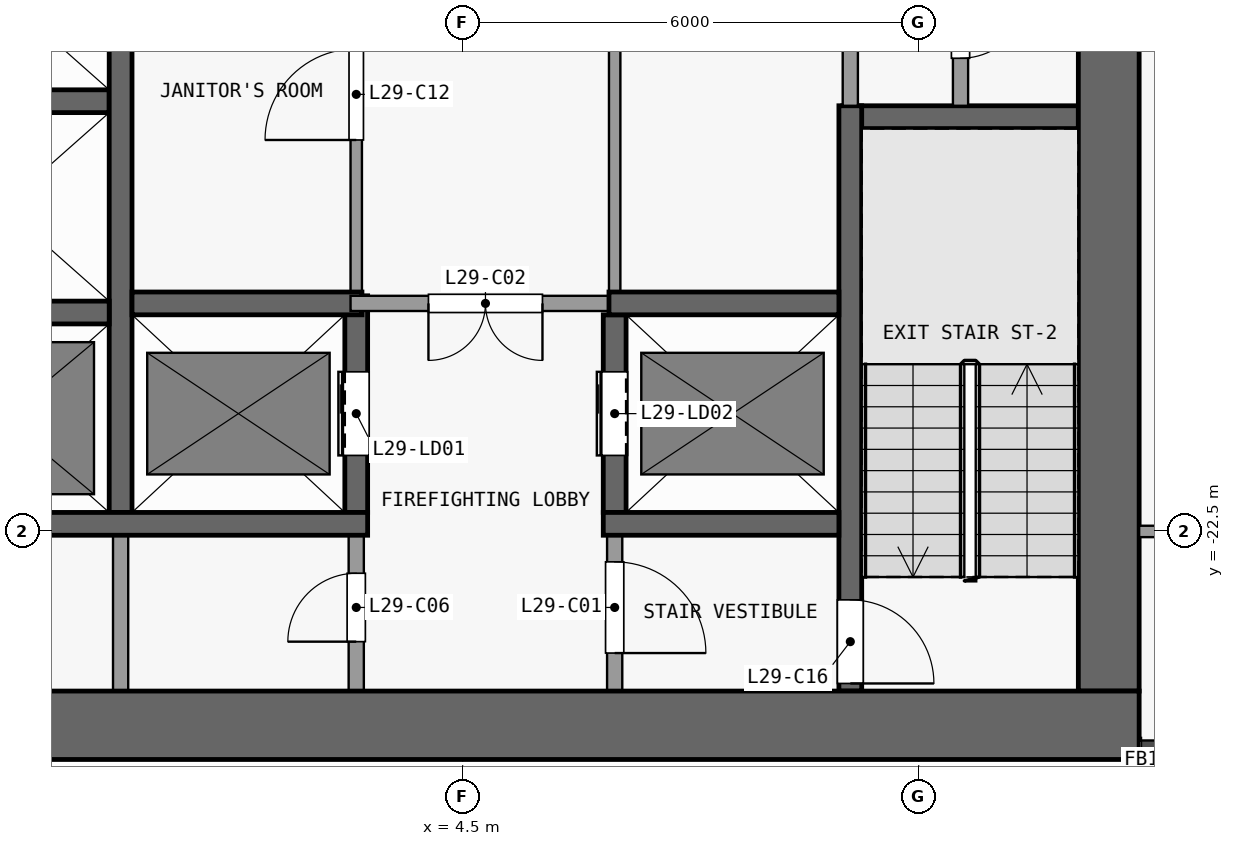
"""IFC4 building model, lengths in metres.
Left out: names, types, materials, properties, quantities, classifications, styles, units other than length and angle.
Written with IfcOpenShell. Run it as: python <this file> out.ifc"""

import sys

from ifc_helpers import new_model, si_unit, direction, frame, frame_2d, origin, place, context, subcontext, project, spatial, rectangle, extrude, element, fill, save


model = new_model("IFC4")
c1 = context("Model", 3, precision=1e-05, world=origin(), true_north=direction((0.0, 1.0)))
c2 = subcontext(c1, "Body", "Model", "MODEL_VIEW")
j1 = project(units=[si_unit("LENGTHUNIT", "METRE"), si_unit("PLANEANGLEUNIT", "RADIAN")], contexts=[c1])
p1 = place(None, origin())
s1 = spatial("IfcSite", under=j1, at=p1, CompositionType="ELEMENT")
p2 = place(p1, origin())
s2 = spatial("IfcBuilding", under=s1, at=p2, CompositionType="ELEMENT")
p3 = place(p2, frame((0.0, 0.0, 117.1)))
s3 = spatial("IfcBuildingStorey", under=s2, at=p3, CompositionType="ELEMENT", Elevation=117.1)
p4 = place(p3, frame((-13.4, -25.05, 0.0), z_axis=(0.0, 0.0, 1.0), x_axis=(1.0, 0.0, 0.0)))
e1 = element("IfcWall", 1, at=p4, inside=s3, PredefinedType="SHEAR", context=c2, shape_type="SweptSolid", body=[
    extrude(rectangle(XDim=26.8, YDim=0.9, at=frame_2d((13.4, 0.0))), origin(), (0.0, 0.0, 1.0), 3.3),
])
p5 = place(p3, frame((13.0, -24.6, 0.0), z_axis=(0.0, 0.0, 1.0), x_axis=(0.0, 1.0, 0.0)))
e2 = element("IfcWall", 2, at=p5, inside=s3, PredefinedType="SHEAR", context=c2, shape_type="SweptSolid", body=[
    extrude(rectangle(XDim=16.1, YDim=0.8, at=frame_2d((8.05, 0.0))), origin(), (0.0, 0.0, 1.0), 3.3),
])
p6 = place(p3, frame((-2.95, -22.4, 0.0), z_axis=(0.0, 0.0, 1.0), x_axis=(1.0, 0.0, 0.0)))
e3 = element("IfcWall", 3, at=p6, inside=s3, PredefinedType="SHEAR", context=c2, shape_type="SweptSolid", body=[
    extrude(rectangle(XDim=6.2, YDim=0.3, at=frame_2d((3.1, 0.0))), origin(), (0.0, 0.0, 1.0), 3.3),
])
p7 = place(p3, frame((6.35, -22.4, 0.0), z_axis=(0.0, 0.0, 1.0), x_axis=(1.0, 0.0, 0.0)))
e4 = element("IfcWall", 4, at=p7, inside=s3, PredefinedType="SHEAR", context=c2, shape_type="SweptSolid", body=[
    extrude(rectangle(XDim=3.1, YDim=0.3, at=frame_2d((1.55, 0.0))), origin(), (0.0, 0.0, 1.0), 3.3),
])
p8 = place(p3, frame((-2.95, -19.62, 0.0), z_axis=(0.0, 0.0, 1.0), x_axis=(1.0, 0.0, 0.0)))
e5 = element("IfcWall", 5, at=p8, inside=s3, PredefinedType="SHEAR", context=c2, shape_type="SweptSolid", body=[
    extrude(rectangle(XDim=2.8, YDim=0.3, at=frame_2d((1.4, 0.0))), origin(), (0.0, 0.0, 1.0), 3.3),
])
p9 = place(p3, frame((0.15, -19.5, 0.0), z_axis=(0.0, 0.0, 1.0), x_axis=(1.0, 0.0, 0.0)))
e6 = element("IfcWall", 6, at=p9, inside=s3, PredefinedType="SHEAR", context=c2, shape_type="SweptSolid", body=[
    extrude(rectangle(XDim=3.025, YDim=0.3, at=frame_2d((1.513, 0.0))), origin(), (0.0, 0.0, 1.0), 3.3),
])
p10 = place(p3, frame((6.575, -19.5, 0.0), z_axis=(0.0, 0.0, 1.0), x_axis=(-1.0, 0.0, 0.0)))
e7 = element("IfcWall", 7, at=p10, inside=s3, PredefinedType="PARTITIONING", context=c2, shape_type="SweptSolid", body=[
    extrude(rectangle(XDim=3.55, YDim=0.2, at=frame_2d((1.775, 0.0))), origin(), (0.0, 0.0, 1.0), 3.3),
])
p11 = place(p10, frame((1.025, 0.0, 0.0)))
e8 = element("IfcOpeningElement", 8, at=p11, cuts=e7, PredefinedType="OPENING", context=c2, shape_type="SweptSolid", body=[
    extrude(rectangle(XDim=1.5, YDim=2.1, at=frame_2d((0.75, 1.05))), frame((0.0, 0.11, 0.0), z_axis=(0.0, -1.0, 0.0), x_axis=(1.0, 0.0, 0.0)), (0.0, 0.0, 1.0), 0.22),
])
p12 = place(p3, frame((6.425, -19.5, 0.0), z_axis=(0.0, 0.0, 1.0), x_axis=(1.0, 0.0, 0.0)))
e9 = element("IfcWall", 9, at=p12, inside=s3, PredefinedType="SHEAR", context=c2, shape_type="SweptSolid", body=[
    extrude(rectangle(XDim=3.025, YDim=0.3, at=frame_2d((1.512, 0.0))), origin(), (0.0, 0.0, 1.0), 3.3),
])
p13 = place(p3, frame((9.5, -17.05, 0.0), z_axis=(0.0, 0.0, 1.0), x_axis=(1.0, 0.0, 0.0)))
e10 = element("IfcWall", 10, at=p13, inside=s3, PredefinedType="SHEAR", context=c2, shape_type="SweptSolid", body=[
    extrude(rectangle(XDim=3.1, YDim=0.3, at=frame_2d((1.55, 0.0))), origin(), (0.0, 0.0, 1.0), 3.3),
])
p14 = place(p3, frame((-2.95, -16.84, 0.0), z_axis=(0.0, 0.0, 1.0), x_axis=(1.0, 0.0, 0.0)))
e11 = element("IfcWall", 11, at=p14, inside=s3, PredefinedType="SHEAR", context=c2, shape_type="SweptSolid", body=[
    extrude(rectangle(XDim=2.8, YDim=0.3, at=frame_2d((1.4, 0.0))), origin(), (0.0, 0.0, 1.0), 3.3),
])
p15 = place(p3, frame((0.0, -24.6, 0.0), z_axis=(0.0, 0.0, 1.0), x_axis=(0.0, 1.0, 0.0)))
e12 = element("IfcWall", 12, at=p15, inside=s3, PredefinedType="PARTITIONING", context=c2, shape_type="SweptSolid", body=[
    extrude(rectangle(XDim=2.05, YDim=0.2, at=frame_2d((1.025, 0.0))), origin(), (0.0, 0.0, 1.0), 3.3),
])
p16 = place(p3, frame((0.0, -22.25, 0.0), z_axis=(0.0, 0.0, 1.0), x_axis=(0.0, 1.0, 0.0)))
e13 = element("IfcWall", 13, at=p16, inside=s3, PredefinedType="SHEAR", context=c2, shape_type="SweptSolid", body=[
    extrude(rectangle(XDim=13.75, YDim=0.3, at=frame_2d((6.875, 0.0))), origin(), (0.0, 0.0, 1.0), 3.3),
])
p17 = place(p3, frame((3.1, -24.6, 0.0), z_axis=(0.0, 0.0, 1.0), x_axis=(0.0, 1.0, 0.0)))
e14 = element("IfcWall", 14, at=p17, inside=s3, PredefinedType="PARTITIONING", context=c2, shape_type="SweptSolid", body=[
    extrude(rectangle(XDim=2.05, YDim=0.2, at=frame_2d((1.025, 0.0))), origin(), (0.0, 0.0, 1.0), 3.3),
])
p18 = place(p17, frame((0.65, 0.0, 0.0)))
e15 = element("IfcOpeningElement", 15, at=p18, cuts=e14, PredefinedType="OPENING", context=c2, shape_type="SweptSolid", body=[
    extrude(rectangle(XDim=0.9, YDim=2.1, at=frame_2d((0.45, 1.05))), frame((0.0, 0.11, 0.0), z_axis=(0.0, -1.0, 0.0), x_axis=(1.0, 0.0, 0.0)), (0.0, 0.0, 1.0), 0.22),
])
p19 = place(p3, frame((3.1, -22.25, 0.0), z_axis=(0.0, 0.0, 1.0), x_axis=(0.0, 1.0, 0.0)))
e16 = element("IfcWall", 16, at=p19, inside=s3, PredefinedType="SHEAR", context=c2, shape_type="SweptSolid", body=[
    extrude(rectangle(XDim=2.85, YDim=0.3, at=frame_2d((1.425, 0.0))), origin(), (0.0, 0.0, 1.0), 3.3),
])
p20 = place(p19, frame((0.75, 0.0, 0.0)))
e17 = element("IfcOpeningElement", 17, at=p20, cuts=e16, PredefinedType="OPENING", context=c2, shape_type="SweptSolid", body=[
    extrude(rectangle(XDim=1.1, YDim=2.1, at=frame_2d((0.55, 1.05))), frame((0.0, 0.16, 0.0), z_axis=(0.0, -1.0, 0.0), x_axis=(1.0, 0.0, 0.0)), (0.0, 0.0, 1.0), 0.32),
])
p21 = place(p3, frame((3.1, -19.4, 0.0), z_axis=(0.0, 0.0, 1.0), x_axis=(0.0, 1.0, 0.0)))
e18 = element("IfcWall", 18, at=p21, inside=s3, PredefinedType="PARTITIONING", context=c2, shape_type="SweptSolid", body=[
    extrude(rectangle(XDim=10.9, YDim=0.15, at=frame_2d((5.45, 0.0))), origin(), (0.0, 0.0, 1.0), 3.3),
])
p22 = place(p21, frame((2.05, 0.0, 0.0)))
e19 = element("IfcOpeningElement", 19, at=p22, cuts=e18, PredefinedType="OPENING", context=c2, shape_type="SweptSolid", body=[
    extrude(rectangle(XDim=1.2, YDim=2.1, at=frame_2d((0.6, 1.05))), frame((0.0, 0.085, 0.0), z_axis=(0.0, -1.0, 0.0), x_axis=(1.0, 0.0, 0.0)), (0.0, 0.0, 1.0), 0.17),
])
p23 = place(p21, frame((7.55, 0.0, 0.0)))
e20 = element("IfcOpeningElement", 20, at=p23, cuts=e18, PredefinedType="OPENING", context=c2, shape_type="SweptSolid", body=[
    extrude(rectangle(XDim=1.2, YDim=2.1, at=frame_2d((0.6, 1.05))), frame((0.0, 0.085, 0.0), z_axis=(0.0, -1.0, 0.0), x_axis=(1.0, 0.0, 0.0)), (0.0, 0.0, 1.0), 0.17),
])
p24 = place(p3, frame((6.5, -22.55, 0.0), z_axis=(0.0, 0.0, 1.0), x_axis=(0.0, -1.0, 0.0)))
e21 = element("IfcWall", 21, at=p24, inside=s3, PredefinedType="PARTITIONING", context=c2, shape_type="SweptSolid", body=[
    extrude(rectangle(XDim=2.05, YDim=0.2, at=frame_2d((1.025, 0.0))), origin(), (0.0, 0.0, 1.0), 3.3),
])
p25 = place(p24, frame((0.35, 0.0, 0.0)))
e22 = element("IfcOpeningElement", 22, at=p25, cuts=e21, PredefinedType="OPENING", context=c2, shape_type="SweptSolid", body=[
    extrude(rectangle(XDim=1.2, YDim=2.1, at=frame_2d((0.6, 1.05))), frame((0.0, 0.11, 0.0), z_axis=(0.0, -1.0, 0.0), x_axis=(1.0, 0.0, 0.0)), (0.0, 0.0, 1.0), 0.22),
])
p26 = place(p3, frame((6.5, -22.25, 0.0), z_axis=(0.0, 0.0, 1.0), x_axis=(0.0, 1.0, 0.0)))
e23 = element("IfcWall", 23, at=p26, inside=s3, PredefinedType="SHEAR", context=c2, shape_type="SweptSolid", body=[
    extrude(rectangle(XDim=2.6, YDim=0.3, at=frame_2d((1.3, 0.0))), origin(), (0.0, 0.0, 1.0), 3.3),
])
p27 = place(p26, frame((0.75, 0.0, 0.0)))
e24 = element("IfcOpeningElement", 24, at=p27, cuts=e23, PredefinedType="OPENING", context=c2, shape_type="SweptSolid", body=[
    extrude(rectangle(XDim=1.1, YDim=2.1, at=frame_2d((0.55, 1.05))), frame((0.0, 0.16, 0.0), z_axis=(0.0, -1.0, 0.0), x_axis=(1.0, 0.0, 0.0)), (0.0, 0.0, 1.0), 0.32),
])
p28 = place(p3, frame((6.5, -11.35, 0.0), z_axis=(0.0, 0.0, 1.0), x_axis=(0.0, -1.0, 0.0)))
e25 = element("IfcWall", 25, at=p28, inside=s3, PredefinedType="PARTITIONING", context=c2, shape_type="SweptSolid", body=[
    extrude(rectangle(XDim=8.0, YDim=0.15, at=frame_2d((4.0, 0.0))), origin(), (0.0, 0.0, 1.0), 3.3),
])
p29 = place(p28, frame((3.425, 0.0, 0.0)))
e26 = element("IfcOpeningElement", 26, at=p29, cuts=e25, PredefinedType="OPENING", context=c2, shape_type="SweptSolid", body=[
    extrude(rectangle(XDim=1.2, YDim=2.1, at=frame_2d((0.6, 1.05))), frame((0.0, 0.085, 0.0), z_axis=(0.0, -1.0, 0.0), x_axis=(1.0, 0.0, 0.0)), (0.0, 0.0, 1.0), 0.17),
])
p30 = place(p3, frame((9.6, -16.9, 0.0), z_axis=(0.0, 0.0, 1.0), x_axis=(0.0, -1.0, 0.0)))
e27 = element("IfcWall", 27, at=p30, inside=s3, PredefinedType="SHEAR", context=c2, shape_type="SweptSolid", body=[
    extrude(rectangle(XDim=7.7, YDim=0.3, at=frame_2d((3.85, 0.0))), origin(), (0.0, 0.0, 1.0), 3.3),
])
p31 = place(p30, frame((6.5, 0.0, 0.0)))
e28 = element("IfcOpeningElement", 28, at=p31, cuts=e27, PredefinedType="OPENING", context=c2, shape_type="SweptSolid", body=[
    extrude(rectangle(XDim=1.1, YDim=2.1, at=frame_2d((0.55, 1.05))), frame((0.0, 0.16, 0.0), z_axis=(0.0, -1.0, 0.0), x_axis=(1.0, 0.0, 0.0)), (0.0, 0.0, 1.0), 0.32),
])
p32 = place(p3, frame((9.6, -16.9, 0.0), z_axis=(0.0, 0.0, 1.0), x_axis=(0.0, 1.0, 0.0)))
e29 = element("IfcWall", 29, at=p32, inside=s3, PredefinedType="PARTITIONING", context=c2, shape_type="SweptSolid", body=[
    extrude(rectangle(XDim=5.75, YDim=0.2, at=frame_2d((2.875, 0.0))), origin(), (0.0, 0.0, 1.0), 3.3),
])
p33 = place(p3, frame((11.05, -14.5, 0.0), z_axis=(0.0, 0.0, 1.0), x_axis=(0.0, -1.0, 0.0)))
e30 = element("IfcWall", 30, at=p33, inside=s3, PredefinedType="PARTITIONING", context=c2, shape_type="SweptSolid", body=[
    extrude(rectangle(XDim=2.4, YDim=0.2, at=frame_2d((1.2, 0.0))), origin(), (0.0, 0.0, 1.0), 3.3),
])
p34 = place(p33, frame((0.875, 0.0, 0.0)))
e31 = element("IfcOpeningElement", 31, at=p34, cuts=e30, PredefinedType="OPENING", context=c2, shape_type="SweptSolid", body=[
    extrude(rectangle(XDim=0.9, YDim=2.1, at=frame_2d((0.45, 1.05))), frame((0.0, 0.11, 0.0), z_axis=(0.0, -1.0, 0.0), x_axis=(1.0, 0.0, 0.0)), (0.0, 0.0, 1.0), 0.22),
])
p35 = place(p3, frame((13.4, -22.5, 0.0), z_axis=(0.0, 0.0, 1.0), x_axis=(1.0, 0.0, 0.0)))
e32 = element("IfcWall", 32, at=p35, inside=s3, PredefinedType="PARTITIONING", context=c2, shape_type="SweptSolid", body=[
    extrude(rectangle(XDim=2.925, YDim=0.15, at=frame_2d((1.462, 0.0))), origin(), (0.0, 0.0, 1.0), 3.3),
])
p36 = place(p35, frame((1.0, 0.0, 0.0)))
e33 = element("IfcOpeningElement", 33, at=p36, cuts=e32, PredefinedType="OPENING", context=c2, shape_type="SweptSolid", body=[
    extrude(rectangle(XDim=0.9, YDim=2.1, at=frame_2d((0.45, 1.05))), frame((0.0, 0.085, 0.0), z_axis=(0.0, -1.0, 0.0), x_axis=(1.0, 0.0, 0.0)), (0.0, 0.0, 1.0), 0.17),
])
p37 = place(p20, origin())
e34 = element("IfcDoor", 34, at=p37, inside=s3, OperationType="DOUBLE_DOOR_SLIDING", PredefinedType="DOOR", context=c2, shape_type="SweptSolid", body=[
    extrude(rectangle(XDim=1.1, YDim=2.1, at=frame_2d((0.55, 1.05))), frame((0.0, 0.025, 0.0), z_axis=(0.0, -1.0, 0.0), x_axis=(1.0, 0.0, 0.0)), (0.0, 0.0, 1.0), 0.05),
])
fill(e17, e34)
p38 = place(p27, origin())
e35 = element("IfcDoor", 35, at=p38, inside=s3, OperationType="DOUBLE_DOOR_SLIDING", PredefinedType="DOOR", context=c2, shape_type="SweptSolid", body=[
    extrude(rectangle(XDim=1.1, YDim=2.1, at=frame_2d((0.55, 1.05))), frame((0.0, 0.025, 0.0), z_axis=(0.0, -1.0, 0.0), x_axis=(1.0, 0.0, 0.0)), (0.0, 0.0, 1.0), 0.05),
])
fill(e24, e35)
p39 = place(p25, origin())
e36 = element("IfcDoor", 36, at=p39, inside=s3, OperationType="SINGLE_SWING_RIGHT", PredefinedType="DOOR", context=c2, shape_type="SweptSolid", body=[
    extrude(rectangle(XDim=1.2, YDim=2.1, at=frame_2d((0.6, 1.05))), frame((0.0, 0.025, 0.0), z_axis=(0.0, -1.0, 0.0), x_axis=(1.0, 0.0, 0.0)), (0.0, 0.0, 1.0), 0.05),
])
fill(e22, e36)
p40 = place(p11, origin())
e37 = element("IfcDoor", 37, at=p40, inside=s3, OperationType="DOUBLE_DOOR_SINGLE_SWING", PredefinedType="DOOR", context=c2, shape_type="SweptSolid", body=[
    extrude(rectangle(XDim=1.5, YDim=2.1, at=frame_2d((0.75, 1.05))), frame((0.0, 0.025, 0.0), z_axis=(0.0, -1.0, 0.0), x_axis=(1.0, 0.0, 0.0)), (0.0, 0.0, 1.0), 0.05),
])
fill(e8, e37)
p41 = place(p18, origin())
e38 = element("IfcDoor", 38, at=p41, inside=s3, OperationType="SINGLE_SWING_LEFT", PredefinedType="DOOR", context=c2, shape_type="SweptSolid", body=[
    extrude(rectangle(XDim=0.9, YDim=2.1, at=frame_2d((0.45, 1.05))), frame((0.0, 0.025, 0.0), z_axis=(0.0, -1.0, 0.0), x_axis=(1.0, 0.0, 0.0)), (0.0, 0.0, 1.0), 0.05),
])
fill(e15, e38)
p42 = place(p34, origin())
e39 = element("IfcDoor", 39, at=p42, inside=s3, OperationType="SINGLE_SWING_LEFT", PredefinedType="DOOR", context=c2, shape_type="SweptSolid", body=[
    extrude(rectangle(XDim=0.9, YDim=2.1, at=frame_2d((0.45, 1.05))), frame((0.0, 0.025, 0.0), z_axis=(0.0, -1.0, 0.0), x_axis=(1.0, 0.0, 0.0)), (0.0, 0.0, 1.0), 0.05),
])
fill(e31, e39)
p43 = place(p22, origin())
e40 = element("IfcDoor", 40, at=p43, inside=s3, OperationType="SINGLE_SWING_LEFT", PredefinedType="DOOR", context=c2, shape_type="SweptSolid", body=[
    extrude(rectangle(XDim=1.2, YDim=2.1, at=frame_2d((0.6, 1.05))), frame((0.0, 0.025, 0.0), z_axis=(0.0, -1.0, 0.0), x_axis=(1.0, 0.0, 0.0)), (0.0, 0.0, 1.0), 0.05),
])
fill(e19, e40)
p44 = place(p31, origin())
e41 = element("IfcDoor", 41, at=p44, inside=s3, OperationType="SINGLE_SWING_RIGHT", PredefinedType="DOOR", context=c2, shape_type="SweptSolid", body=[
    extrude(rectangle(XDim=1.1, YDim=2.1, at=frame_2d((0.55, 1.05))), frame((0.0, 0.025, 0.0), z_axis=(0.0, -1.0, 0.0), x_axis=(1.0, 0.0, 0.0)), (0.0, 0.0, 1.0), 0.05),
])
fill(e28, e41)
save(model, sys.argv[1])
